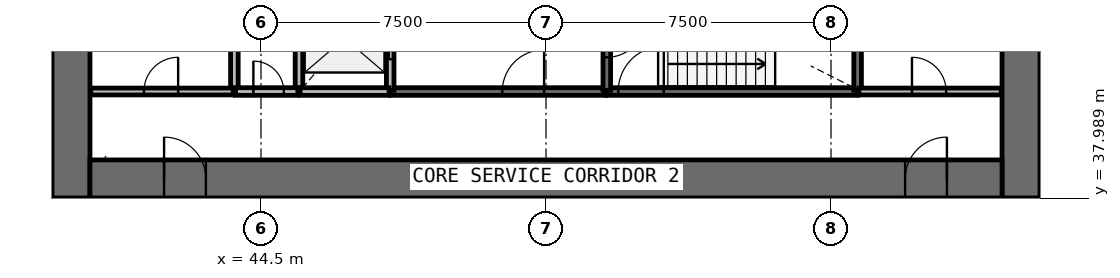
"""IFC4 building model, lengths in metres.
Left out: names, types, materials, properties, quantities, classifications, styles, units other than length and angle.
Written with IfcOpenShell. Run it as: python <this file> out.ifc"""

import sys

from ifc_helpers import new_model, si_unit, direction, frame, frame_2d, origin, place, context, subcontext, project, spatial, rectangle, extrude, source, transform, mapped, element, fill, save


model = new_model("IFC4")
c1 = context("Model", 3, precision=1e-05, world=origin(), true_north=direction((0.0, 1.0)))
c2 = subcontext(c1, "Body", "Model", "MODEL_VIEW")
j1 = project(units=[si_unit("LENGTHUNIT", "METRE"), si_unit("PLANEANGLEUNIT", "RADIAN")], contexts=[c1])
p1 = place(None, origin())
s1 = spatial("IfcSite", under=j1, at=p1, CompositionType="ELEMENT")
p2 = place(p1, origin())
s2 = spatial("IfcBuilding", under=s1, at=p2, CompositionType="ELEMENT")
p3 = place(p2, frame((0.0, 0.0, 31.4)))
s3 = spatial("IfcBuildingStorey", under=s2, at=p3, CompositionType="ELEMENT", Elevation=31.4)
p4 = place(p3, frame((64.5, 38.0, 0.0), z_axis=(0.0, 0.0, 1.0), x_axis=(0.0, 1.0, 0.0)))
e1 = element("IfcWall", 1, at=p4, inside=s3, PredefinedType="SHEAR", context=c2, shape_type="SweptSolid", body=[
    extrude(rectangle(XDim=20.0, YDim=1.0, at=frame_2d((10.0, 0.0))), origin(), (0.0, 0.0, 1.0), 4.4),
])
p5 = place(p4, frame((9.1, 0.0, 0.0)))
e2 = element("IfcOpeningElement", 2, at=p5, cuts=e1, PredefinedType="OPENING", context=c2, shape_type="SweptSolid", body=[
    extrude(rectangle(XDim=1.8, YDim=2.1, at=frame_2d((0.9, 1.05))), frame((0.0, 0.51, 0.0), z_axis=(0.0, -1.0, 0.0), x_axis=(1.0, 0.0, 0.0)), (0.0, 0.0, 1.0), 1.02),
])
p6 = place(p3, frame((39.5, 58.0, 0.0), z_axis=(0.0, 0.0, 1.0), x_axis=(0.0, -1.0, 0.0)))
e3 = element("IfcWall", 3, at=p6, inside=s3, PredefinedType="SHEAR", context=c2, shape_type="SweptSolid", body=[
    extrude(rectangle(XDim=20.0, YDim=1.0, at=frame_2d((10.0, 0.0))), origin(), (0.0, 0.0, 1.0), 4.4),
])
p7 = place(p6, frame((9.1, 0.0, 0.0)))
e4 = element("IfcOpeningElement", 4, at=p7, cuts=e3, PredefinedType="OPENING", context=c2, shape_type="SweptSolid", body=[
    extrude(rectangle(XDim=1.8, YDim=2.1, at=frame_2d((0.9, 1.05))), frame((0.0, 0.51, 0.0), z_axis=(0.0, -1.0, 0.0), x_axis=(1.0, 0.0, 0.0)), (0.0, 0.0, 1.0), 1.02),
])
p8 = place(p3, frame((40.0, 38.5, 0.0), z_axis=(0.0, 0.0, 1.0), x_axis=(1.0, 0.0, 0.0)))
e5 = element("IfcWall", 5, at=p8, inside=s3, PredefinedType="SHEAR", context=c2, shape_type="SweptSolid", body=[
    extrude(rectangle(XDim=24.0, YDim=1.0, at=frame_2d((12.0, 0.0))), origin(), (0.0, 0.0, 1.0), 4.4),
])
p9 = place(p8, frame((21.45, 0.0, 0.0)))
e6 = element("IfcOpeningElement", 6, at=p9, cuts=e5, PredefinedType="OPENING", context=c2, shape_type="SweptSolid", body=[
    extrude(rectangle(XDim=1.1, YDim=2.1, at=frame_2d((0.55, 1.05))), frame((0.0, 0.51, 0.0), z_axis=(0.0, -1.0, 0.0), x_axis=(1.0, 0.0, 0.0)), (0.0, 0.0, 1.0), 1.02),
])
p10 = place(p8, frame((1.95, 0.0, 0.0)))
e7 = element("IfcOpeningElement", 7, at=p10, cuts=e5, PredefinedType="OPENING", context=c2, shape_type="SweptSolid", body=[
    extrude(rectangle(XDim=1.1, YDim=2.1, at=frame_2d((0.55, 1.05))), frame((0.0, 0.51, 0.0), z_axis=(0.0, -1.0, 0.0), x_axis=(1.0, 0.0, 0.0)), (0.0, 0.0, 1.0), 1.02),
])
p11 = place(p3, frame((53.6, 40.8, 0.0), z_axis=(0.0, 0.0, 1.0), x_axis=(1.0, 0.0, 0.0)))
e8 = element("IfcWall", 8, at=p11, inside=s3, PredefinedType="SOLIDWALL", context=c2, shape_type="SweptSolid", body=[
    extrude(rectangle(XDim=6.6, YDim=0.2, at=frame_2d((3.3, 0.0))), origin(), (0.0, 0.0, 1.0), 3.95),
])
p12 = place(p11, frame((0.3, 0.0, 0.0)))
e9 = element("IfcOpeningElement", 9, at=p12, cuts=e8, PredefinedType="OPENING", context=c2, shape_type="SweptSolid", body=[
    extrude(rectangle(XDim=1.2, YDim=2.1, at=frame_2d((0.6, 1.05))), frame((0.0, 0.11, 0.0), z_axis=(0.0, -1.0, 0.0), x_axis=(1.0, 0.0, 0.0)), (0.0, 0.0, 1.0), 0.22),
])
p13 = place(p3, frame((47.9, 40.8, 0.0), z_axis=(0.0, 0.0, 1.0), x_axis=(1.0, 0.0, 0.0)))
e10 = element("IfcWall", 10, at=p13, inside=s3, PredefinedType="SOLIDWALL", context=c2, shape_type="SweptSolid", body=[
    extrude(rectangle(XDim=5.67, YDim=0.2, at=frame_2d((2.835, 0.0))), origin(), (0.0, 0.0, 1.0), 3.95),
])
p14 = place(p13, frame((2.95, 0.0, 0.0)))
e11 = element("IfcOpeningElement", 11, at=p14, cuts=e10, PredefinedType="OPENING", context=c2, shape_type="SweptSolid", body=[
    extrude(rectangle(XDim=1.1, YDim=2.1, at=frame_2d((0.55, 1.05))), frame((0.0, 0.11, 0.0), z_axis=(0.0, -1.0, 0.0), x_axis=(1.0, 0.0, 0.0)), (0.0, 0.0, 1.0), 0.22),
])
for number, where, z_axis, x_axis in (
    (12, (43.8, 43.6, 0.0), (0.0, 0.0, 1.0), (0.0, -1.0, 0.0)),
    (13, (45.5, 43.6, 0.0), (0.0, 0.0, 1.0), (0.0, -1.0, 0.0)),
):
    element("IfcWall", number, at=place(p3, frame(where, z_axis=z_axis, x_axis=x_axis)), inside=s3, PredefinedType="SOLIDWALL", context=c2, shape_type="SweptSolid", body=[
        extrude(rectangle(XDim=2.8, YDim=0.2, at=frame_2d((1.4, 0.0))), origin(), (0.0, 0.0, 1.0), 3.95),
    ])
p15 = place(p3, frame((47.9, 40.83, 0.0), z_axis=(0.0, 0.0, 1.0), x_axis=(0.0, 1.0, 0.0)))
e14 = element("IfcWall", 14, at=p15, inside=s3, PredefinedType="SOLIDWALL", context=c2, shape_type="SweptSolid", body=[
    extrude(rectangle(XDim=2.77, YDim=0.2, at=frame_2d((1.385, 0.0))), origin(), (0.0, 0.0, 1.0), 3.95),
])
p16 = place(p15, frame((0.82, 0.0, 0.0)))
e15 = element("IfcOpeningElement", 15, at=p16, cuts=e14, PredefinedType="OPENING", context=c2, shape_type="SweptSolid", body=[
    extrude(rectangle(XDim=1.1, YDim=2.1, at=frame_2d((0.55, 1.05))), frame((0.0, 0.11, 0.0), z_axis=(0.0, -1.0, 0.0), x_axis=(1.0, 0.0, 0.0)), (0.0, 0.0, 1.0), 0.22),
])
p17 = place(p3, frame((60.2, 40.83, 0.0), z_axis=(0.0, 0.0, 1.0), x_axis=(0.0, 1.0, 0.0)))
e16 = element("IfcWall", 16, at=p17, inside=s3, PredefinedType="SOLIDWALL", context=c2, shape_type="SweptSolid", body=[
    extrude(rectangle(XDim=2.77, YDim=0.2, at=frame_2d((1.385, 0.0))), origin(), (0.0, 0.0, 1.0), 3.95),
])
p18 = place(p3, frame((53.6, 43.6, 0.0), z_axis=(0.0, 0.0, 1.0), x_axis=(0.0, -1.0, 0.0)))
e17 = element("IfcWall", 17, at=p18, inside=s3, PredefinedType="SOLIDWALL", context=c2, shape_type="SweptSolid", body=[
    extrude(rectangle(XDim=2.77, YDim=0.2, at=frame_2d((1.385, 0.0))), origin(), (0.0, 0.0, 1.0), 3.95),
])
p19 = place(p18, frame((0.9, 0.0, 0.0)))
e18 = element("IfcOpeningElement", 18, at=p19, cuts=e17, PredefinedType="OPENING", context=c2, shape_type="SweptSolid", body=[
    extrude(rectangle(XDim=1.0, YDim=2.1, at=frame_2d((0.5, 1.05))), frame((0.0, 0.11, 0.0), z_axis=(0.0, -1.0, 0.0), x_axis=(1.0, 0.0, 0.0)), (0.0, 0.0, 1.0), 0.22),
])
p20 = place(p3, frame((45.53, 40.8, 0.0), z_axis=(0.0, 0.0, 1.0), x_axis=(1.0, 0.0, 0.0)))
e19 = element("IfcWall", 19, at=p20, inside=s3, PredefinedType="SOLIDWALL", context=c2, shape_type="SweptSolid", body=[
    extrude(rectangle(XDim=2.34, YDim=0.2, at=frame_2d((1.17, 0.0))), origin(), (0.0, 0.0, 1.0), 3.95),
])
p21 = place(p3, frame((43.83, 40.8, 0.0), z_axis=(0.0, 0.0, 1.0), x_axis=(1.0, 0.0, 0.0)))
e20 = element("IfcWall", 20, at=p21, inside=s3, PredefinedType="SOLIDWALL", context=c2, shape_type="SweptSolid", body=[
    extrude(rectangle(XDim=1.64, YDim=0.2, at=frame_2d((0.82, 0.0))), origin(), (0.0, 0.0, 1.0), 3.95),
])
p22 = place(p21, frame((0.47, 0.0, 0.0)))
e21 = element("IfcOpeningElement", 21, at=p22, cuts=e20, PredefinedType="OPENING", context=c2, shape_type="SweptSolid", body=[
    extrude(rectangle(XDim=0.8, YDim=2.1, at=frame_2d((0.4, 1.05))), frame((0.0, 0.11, 0.0), z_axis=(0.0, -1.0, 0.0), x_axis=(1.0, 0.0, 0.0)), (0.0, 0.0, 1.0), 0.22),
])
p23 = place(p3, frame((40.02, 40.8, 0.0), z_axis=(0.0, 0.0, 1.0), x_axis=(1.0, 0.0, 0.0)))
e22 = element("IfcWall", 22, at=p23, inside=s3, PredefinedType="PARTITIONING", context=c2, shape_type="SweptSolid", body=[
    extrude(rectangle(XDim=3.75, YDim=0.18, at=frame_2d((1.875, 0.0))), origin(), (0.0, 0.0, 1.0), 3.95),
])
p24 = place(p23, frame((1.4, 0.0, 0.0)))
e23 = element("IfcOpeningElement", 23, at=p24, cuts=e22, PredefinedType="OPENING", context=c2, shape_type="SweptSolid", body=[
    extrude(rectangle(XDim=0.9, YDim=2.1, at=frame_2d((0.45, 1.05))), frame((0.0, 0.1, 0.0), z_axis=(0.0, -1.0, 0.0), x_axis=(1.0, 0.0, 0.0)), (0.0, 0.0, 1.0), 0.2),
])
p25 = place(p3, frame((60.23, 40.8, 0.0), z_axis=(0.0, 0.0, 1.0), x_axis=(1.0, 0.0, 0.0)))
e24 = element("IfcWall", 24, at=p25, inside=s3, PredefinedType="PARTITIONING", context=c2, shape_type="SweptSolid", body=[
    extrude(rectangle(XDim=3.75, YDim=0.18, at=frame_2d((1.875, 0.0))), origin(), (0.0, 0.0, 1.0), 3.95),
])
p26 = place(p25, frame((1.4, 0.0, 0.0)))
e25 = element("IfcOpeningElement", 25, at=p26, cuts=e24, PredefinedType="OPENING", context=c2, shape_type="SweptSolid", body=[
    extrude(rectangle(XDim=0.9, YDim=2.1, at=frame_2d((0.45, 1.05))), frame((0.0, 0.1, 0.0), z_axis=(0.0, -1.0, 0.0), x_axis=(1.0, 0.0, 0.0)), (0.0, 0.0, 1.0), 0.2),
])
m1 = source(origin(), c2, "Body", "SweptSolid", [
    extrude(rectangle(XDim=1.1, YDim=2.1, at=frame_2d((0.55, 1.05))), frame((0.0, 0.025, 0.0), z_axis=(0.0, -1.0, 0.0), x_axis=(1.0, 0.0, 0.0)), (0.0, 0.0, 1.0), 0.05),
])
p27 = place(p16, origin())
e26 = element("IfcDoor", 26, at=p27, inside=s3, OperationType="DOUBLE_DOOR_SLIDING", PredefinedType="USERDEFINED", context=c2, shape_type="MappedRepresentation", body=[
    mapped(m1, transform((0.0, 0.0, 0.0), scale=1.0)),
])
fill(e15, e26)
m2 = source(origin(), c2, "Body", "SweptSolid", [
    extrude(rectangle(XDim=1.2, YDim=2.1, at=frame_2d((0.6, 1.05))), frame((0.0, 0.025, 0.0), z_axis=(0.0, -1.0, 0.0), x_axis=(1.0, 0.0, 0.0)), (0.0, 0.0, 1.0), 0.05),
])
p28 = place(p12, origin())
e27 = element("IfcDoor", 27, at=p28, inside=s3, OperationType="SINGLE_SWING_RIGHT", PredefinedType="DOOR", context=c2, shape_type="MappedRepresentation", body=[
    mapped(m2, transform((0.0, 0.0, 0.0), scale=1.0)),
])
fill(e9, e27)
m3 = source(origin(), c2, "Body", "SweptSolid", [
    extrude(rectangle(XDim=1.0, YDim=2.1, at=frame_2d((0.5, 1.05))), frame((0.0, 0.025, 0.0), z_axis=(0.0, -1.0, 0.0), x_axis=(1.0, 0.0, 0.0)), (0.0, 0.0, 1.0), 0.05),
])
p29 = place(p19, origin())
e28 = element("IfcDoor", 28, at=p29, inside=s3, OperationType="SINGLE_SWING_LEFT", PredefinedType="DOOR", context=c2, shape_type="MappedRepresentation", body=[
    mapped(m3, transform((0.0, 0.0, 0.0), scale=1.0)),
])
fill(e18, e28)
m4 = source(origin(), c2, "Body", "SweptSolid", [
    extrude(rectangle(XDim=1.1, YDim=2.1, at=frame_2d((0.55, 1.05))), frame((0.0, 0.025, 0.0), z_axis=(0.0, -1.0, 0.0), x_axis=(1.0, 0.0, 0.0)), (0.0, 0.0, 1.0), 0.05),
])
p30 = place(p14, origin())
e29 = element("IfcDoor", 29, at=p30, inside=s3, OperationType="SINGLE_SWING_RIGHT", PredefinedType="DOOR", context=c2, shape_type="MappedRepresentation", body=[
    mapped(m4, transform((0.0, 0.0, 0.0), scale=1.0)),
])
fill(e11, e29)
m5 = source(origin(), c2, "Body", "SweptSolid", [
    extrude(rectangle(XDim=0.8, YDim=2.1, at=frame_2d((0.4, 1.05))), frame((0.0, 0.025, 0.0), z_axis=(0.0, -1.0, 0.0), x_axis=(1.0, 0.0, 0.0)), (0.0, 0.0, 1.0), 0.05),
])
p31 = place(p22, origin())
e30 = element("IfcDoor", 30, at=p31, inside=s3, OperationType="SINGLE_SWING_LEFT", PredefinedType="DOOR", context=c2, shape_type="MappedRepresentation", body=[
    mapped(m5, transform((0.0, 0.0, 0.0), scale=1.0)),
])
fill(e21, e30)
m6 = source(origin(), c2, "Body", "SweptSolid", [
    extrude(rectangle(XDim=1.1, YDim=2.1, at=frame_2d((0.55, 1.05))), frame((0.0, 0.025, 0.0), z_axis=(0.0, -1.0, 0.0), x_axis=(1.0, 0.0, 0.0)), (0.0, 0.0, 1.0), 0.05),
])
p32 = place(p9, origin())
e31 = element("IfcDoor", 31, at=p32, inside=s3, OperationType="SINGLE_SWING_RIGHT", PredefinedType="DOOR", context=c2, shape_type="MappedRepresentation", body=[
    mapped(m6, transform((0.0, 0.0, 0.0), scale=1.0)),
])
fill(e6, e31)
p33 = place(p10, origin())
e32 = element("IfcDoor", 32, at=p33, inside=s3, OperationType="SINGLE_SWING_LEFT", PredefinedType="DOOR", context=c2, shape_type="MappedRepresentation", body=[
    mapped(m6, transform((0.0, 0.0, 0.0), scale=1.0)),
])
fill(e7, e32)
m7 = source(origin(), c2, "Body", "SweptSolid", [
    extrude(rectangle(XDim=0.9, YDim=2.1, at=frame_2d((0.45, 1.05))), frame((0.0, 0.025, 0.0), z_axis=(0.0, -1.0, 0.0), x_axis=(1.0, 0.0, 0.0)), (0.0, 0.0, 1.0), 0.05),
])
p34 = place(p24, origin())
e33 = element("IfcDoor", 33, at=p34, inside=s3, OperationType="SINGLE_SWING_RIGHT", PredefinedType="DOOR", context=c2, shape_type="MappedRepresentation", body=[
    mapped(m7, transform((0.0, 0.0, 0.0), scale=1.0)),
])
fill(e23, e33)
p35 = place(p26, origin())
e34 = element("IfcDoor", 34, at=p35, inside=s3, OperationType="SINGLE_SWING_LEFT", PredefinedType="DOOR", context=c2, shape_type="MappedRepresentation", body=[
    mapped(m7, transform((0.0, 0.0, 0.0), scale=1.0)),
])
fill(e25, e34)
save(model, sys.argv[1])
